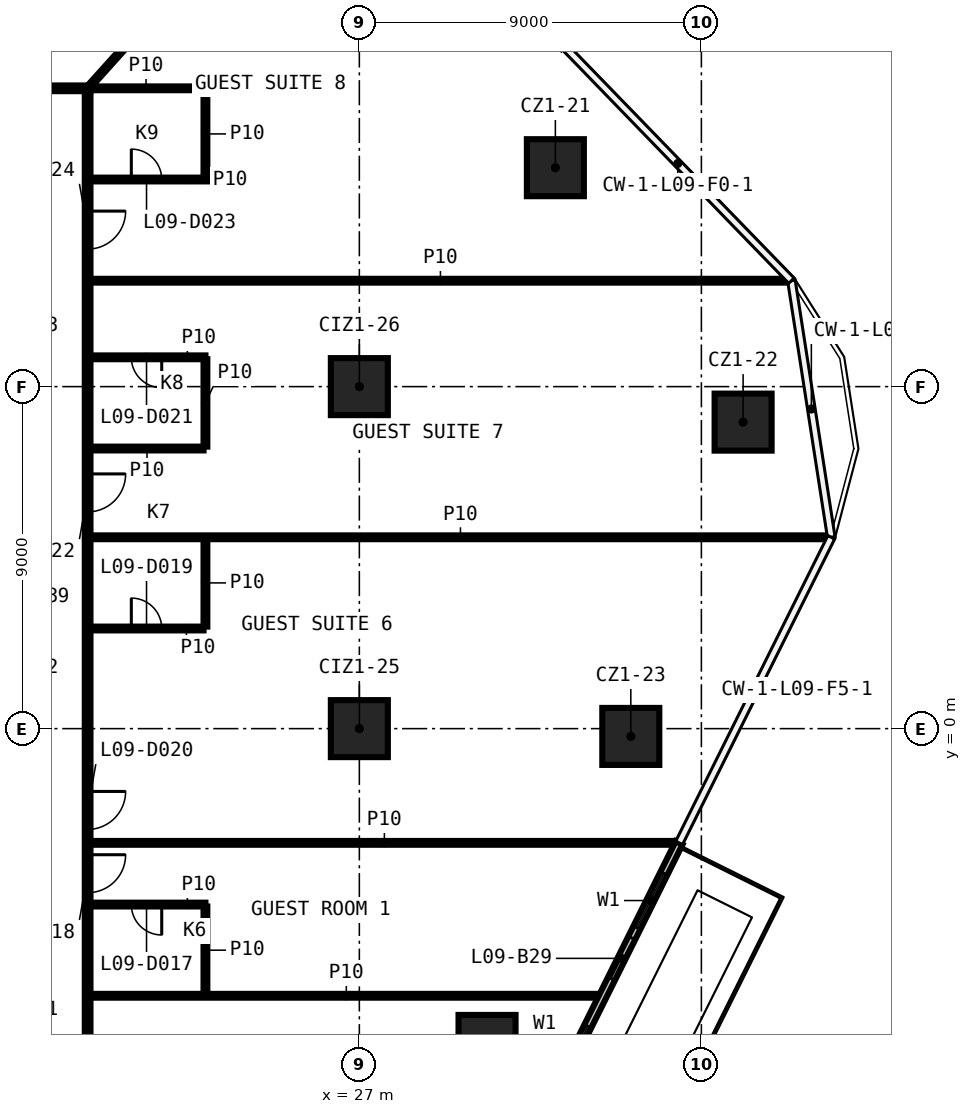
"""IFC4 building model, lengths in metres.
Left out: names, types, materials, properties, quantities, classifications, styles, units other than length and angle.
Written with IfcOpenShell. Run it as: python <this file> out.ifc"""

import sys

from ifc_helpers import new_model, si_unit, direction, frame, frame_2d, origin, origin_2d, place, context, subcontext, project, spatial, rectangle, extrude, element, fill, save


model = new_model("IFC4")
c1 = context("Model", 3, precision=1e-05, world=origin(), true_north=direction((0.0, 1.0)))
c2 = subcontext(c1, "Body", "Model", "MODEL_VIEW")
j1 = project(units=[si_unit("LENGTHUNIT", "METRE"), si_unit("PLANEANGLEUNIT", "RADIAN")], contexts=[c1])
p1 = place(None, origin())
s1 = spatial("IfcSite", under=j1, at=p1, CompositionType="ELEMENT")
p2 = place(p1, origin())
s2 = spatial("IfcBuilding", under=s1, at=p2, CompositionType="ELEMENT")
p3 = place(p2, frame((0.0, 0.0, 55.1)))
s3 = spatial("IfcBuildingStorey", under=s2, at=p3, CompositionType="ELEMENT", Elevation=55.1)
for number, where, z_axis, x_axis in (
    (1, (32.158, 14.761, 0.0), (0.0, 0.0, 1.0), (1.0, 0.0, 0.0)),
    (2, (37.098, 8.066, 0.0), (0.0, 0.0, 1.0), (1.0, 0.0, 0.0)),
    (3, (34.143, -0.205, 0.0), (0.0, 0.0, 1.0), (1.0, 0.0, 0.0)),
    (4, (30.36, -8.284, 0.0), (0.0, 0.0, 1.0), (1.0, 0.0, 0.0)),
    (5, (27.0, 0.0, 0.0), (0.0, 0.0, 1.0), (1.0, 0.0, 0.0)),
    (6, (27.0, 9.0, 0.0), (0.0, 0.0, 1.0), (1.0, 0.0, 0.0)),
):
    element("IfcColumn", number, at=place(p3, frame(where, z_axis=z_axis, x_axis=x_axis)), inside=s3, PredefinedType="COLUMN", context=c2, shape_type="SweptSolid", body=[
        extrude(rectangle(XDim=1.5, YDim=1.5, at=origin_2d()), origin(), (0.0, 0.0, 1.0), 3.3),
    ])
p4 = place(p3, frame((19.925, -7.03, 0.0), z_axis=(0.0, 0.0, 1.0), x_axis=(1.0, 0.0, 0.0)))
e7 = element("IfcWall", 7, at=p4, inside=s3, PredefinedType="PARTITIONING", context=c2, shape_type="SweptSolid", body=[
    extrude(rectangle(XDim=13.464, YDim=0.1, at=frame_2d((6.732, 0.0))), origin(), (0.0, 0.0, 1.0), 3.3),
])
p5 = place(p3, frame((22.95, -4.63, 0.0), z_axis=(0.0, 0.0, 1.0), x_axis=(-1.0, 0.0, 0.0)))
e8 = element("IfcWall", 8, at=p5, inside=s3, PredefinedType="PARTITIONING", context=c2, shape_type="SweptSolid", body=[
    extrude(rectangle(XDim=3.025, YDim=0.1, at=frame_2d((1.512, 0.0))), origin(), (0.0, 0.0, 1.0), 3.3),
])
p6 = place(p5, frame((1.15, 0.0, 0.0)))
e9 = element("IfcOpeningElement", 9, at=p6, cuts=e8, PredefinedType="OPENING", context=c2, shape_type="SweptSolid", body=[
    extrude(rectangle(XDim=0.8, YDim=2.1, at=frame_2d((0.4, 1.05))), frame((0.0, 0.06, 0.0), z_axis=(0.0, -1.0, 0.0), x_axis=(1.0, 0.0, 0.0)), (0.0, 0.0, 1.0), 0.12),
])
p7 = place(p3, frame((19.925, -3.006, 0.0), z_axis=(0.0, 0.0, 1.0), x_axis=(1.0, 0.0, 0.0)))
e10 = element("IfcWall", 10, at=p7, inside=s3, PredefinedType="PARTITIONING", context=c2, shape_type="SweptSolid", body=[
    extrude(rectangle(XDim=15.467, YDim=0.1, at=frame_2d((7.733, 0.0))), origin(), (0.0, 0.0, 1.0), 3.3),
])
p8 = place(p3, frame((19.925, 2.635, 0.0), z_axis=(0.0, 0.0, 1.0), x_axis=(1.0, 0.0, 0.0)))
e11 = element("IfcWall", 11, at=p8, inside=s3, PredefinedType="PARTITIONING", context=c2, shape_type="SweptSolid", body=[
    extrude(rectangle(XDim=2.975, YDim=0.1, at=frame_2d((1.487, 0.0))), origin(), (0.0, 0.0, 1.0), 3.3),
])
p9 = place(p8, frame((1.075, 0.0, 0.0)))
e12 = element("IfcOpeningElement", 12, at=p9, cuts=e11, PredefinedType="OPENING", context=c2, shape_type="SweptSolid", body=[
    extrude(rectangle(XDim=0.8, YDim=2.1, at=frame_2d((0.4, 1.05))), frame((0.0, 0.06, 0.0), z_axis=(0.0, -1.0, 0.0), x_axis=(1.0, 0.0, 0.0)), (0.0, 0.0, 1.0), 0.12),
])
p10 = place(p3, frame((19.925, 5.035, 0.0), z_axis=(0.0, 0.0, 1.0), x_axis=(1.0, 0.0, 0.0)))
e13 = element("IfcWall", 13, at=p10, inside=s3, PredefinedType="PARTITIONING", context=c2, shape_type="SweptSolid", body=[
    extrude(rectangle(XDim=19.47, YDim=0.1, at=frame_2d((9.735, 0.0))), origin(), (0.0, 0.0, 1.0), 3.3),
])
p11 = place(p3, frame((19.925, 7.371, 0.0), z_axis=(0.0, 0.0, 1.0), x_axis=(1.0, 0.0, 0.0)))
e14 = element("IfcWall", 14, at=p11, inside=s3, PredefinedType="PARTITIONING", context=c2, shape_type="SweptSolid", body=[
    extrude(rectangle(XDim=2.975, YDim=0.1, at=frame_2d((1.487, 0.0))), origin(), (0.0, 0.0, 1.0), 3.3),
])
p12 = place(p3, frame((22.95, 9.771, 0.0), z_axis=(0.0, 0.0, 1.0), x_axis=(-1.0, 0.0, 0.0)))
e15 = element("IfcWall", 15, at=p12, inside=s3, PredefinedType="PARTITIONING", context=c2, shape_type="SweptSolid", body=[
    extrude(rectangle(XDim=3.025, YDim=0.1, at=frame_2d((1.512, 0.0))), origin(), (0.0, 0.0, 1.0), 3.3),
])
p13 = place(p12, frame((1.15, 0.0, 0.0)))
e16 = element("IfcOpeningElement", 16, at=p13, cuts=e15, PredefinedType="OPENING", context=c2, shape_type="SweptSolid", body=[
    extrude(rectangle(XDim=0.8, YDim=2.1, at=frame_2d((0.4, 1.05))), frame((0.0, 0.06, 0.0), z_axis=(0.0, -1.0, 0.0), x_axis=(1.0, 0.0, 0.0)), (0.0, 0.0, 1.0), 0.12),
])
p14 = place(p3, frame((19.925, 11.787, 0.0), z_axis=(0.0, 0.0, 1.0), x_axis=(1.0, 0.0, 0.0)))
e17 = element("IfcWall", 17, at=p14, inside=s3, PredefinedType="PARTITIONING", context=c2, shape_type="SweptSolid", body=[
    extrude(rectangle(XDim=18.417, YDim=0.1, at=frame_2d((9.208, 0.0))), origin(), (0.0, 0.0, 1.0), 3.3),
])
p15 = place(p3, frame((19.925, 14.45, 0.0), z_axis=(0.0, 0.0, 1.0), x_axis=(1.0, 0.0, 0.0)))
e18 = element("IfcWall", 18, at=p15, inside=s3, PredefinedType="PARTITIONING", context=c2, shape_type="SweptSolid", body=[
    extrude(rectangle(XDim=3.075, YDim=0.1, at=frame_2d((1.538, 0.0))), origin(), (0.0, 0.0, 1.0), 3.3),
])
p16 = place(p15, frame((1.075, 0.0, 0.0)))
e19 = element("IfcOpeningElement", 19, at=p16, cuts=e18, PredefinedType="OPENING", context=c2, shape_type="SweptSolid", body=[
    extrude(rectangle(XDim=0.8, YDim=2.1, at=frame_2d((0.4, 1.05))), frame((0.0, 0.06, 0.0), z_axis=(0.0, -1.0, 0.0), x_axis=(1.0, 0.0, 0.0)), (0.0, 0.0, 1.0), 0.12),
])
p17 = place(p3, frame((-19.925, 16.85, 0.0), z_axis=(0.0, 0.0, 1.0), x_axis=(1.0, 0.0, 0.0)))
e20 = element("IfcWall", 20, at=p17, inside=s3, PredefinedType="PARTITIONING", context=c2, shape_type="SweptSolid", body=[
    extrude(rectangle(XDim=39.85, YDim=0.15, at=frame_2d((19.925, 0.0))), origin(), (0.0, 0.0, 1.0), 3.3),
])
p18 = place(p17, frame((31.433, 0.0, 0.0)))
e21 = element("IfcOpeningElement", 21, at=p18, cuts=e20, PredefinedType="OPENING", context=c2, shape_type="SweptSolid", body=[
    extrude(rectangle(XDim=0.9, YDim=2.1, at=frame_2d((0.45, 1.05))), frame((0.0, 0.085, 0.0), z_axis=(0.0, -1.0, 0.0), x_axis=(1.0, 0.0, 0.0)), (0.0, 0.0, 1.0), 0.17),
])
p19 = place(p17, frame((22.043, 0.0, 0.0)))
e22 = element("IfcOpeningElement", 22, at=p19, cuts=e20, PredefinedType="OPENING", context=c2, shape_type="SweptSolid", body=[
    extrude(rectangle(XDim=0.9, YDim=2.1, at=frame_2d((0.45, 1.05))), frame((0.0, 0.085, 0.0), z_axis=(0.0, -1.0, 0.0), x_axis=(1.0, 0.0, 0.0)), (0.0, 0.0, 1.0), 0.17),
])
p20 = place(p17, frame((16.957, 0.0, 0.0)))
e23 = element("IfcOpeningElement", 23, at=p20, cuts=e20, PredefinedType="OPENING", context=c2, shape_type="SweptSolid", body=[
    extrude(rectangle(XDim=0.9, YDim=2.1, at=frame_2d((0.45, 1.05))), frame((0.0, 0.085, 0.0), z_axis=(0.0, -1.0, 0.0), x_axis=(1.0, 0.0, 0.0)), (0.0, 0.0, 1.0), 0.17),
])
p21 = place(p17, frame((13.572, 0.0, 0.0)))
e24 = element("IfcOpeningElement", 24, at=p21, cuts=e20, PredefinedType="OPENING", context=c2, shape_type="SweptSolid", body=[
    extrude(rectangle(XDim=0.9, YDim=2.1, at=frame_2d((0.45, 1.05))), frame((0.0, 0.085, 0.0), z_axis=(0.0, -1.0, 0.0), x_axis=(1.0, 0.0, 0.0)), (0.0, 0.0, 1.0), 0.17),
])
p22 = place(p17, frame((7.458, 0.0, 0.0)))
e25 = element("IfcOpeningElement", 25, at=p22, cuts=e20, PredefinedType="OPENING", context=c2, shape_type="SweptSolid", body=[
    extrude(rectangle(XDim=1.0, YDim=2.1, at=frame_2d((0.5, 1.05))), frame((0.0, 0.085, 0.0), z_axis=(0.0, -1.0, 0.0), x_axis=(1.0, 0.0, 0.0)), (0.0, 0.0, 1.0), 0.17),
])
p23 = place(p3, frame((19.775, 16.85, 0.0), z_axis=(0.0, 0.0, 1.0), x_axis=(1.0, 0.0, 0.0)))
e26 = element("IfcWall", 26, at=p23, inside=s3, PredefinedType="PARTITIONING", context=c2, shape_type="SweptSolid", body=[
    extrude(rectangle(XDim=3.225, YDim=0.1, at=frame_2d((1.613, 0.0))), origin(), (0.0, 0.0, 1.0), 3.3),
])
p24 = place(p3, frame((19.85, 16.85, 0.0), z_axis=(0.0, 0.0, 1.0), x_axis=(0.668734291705, 0.743501477536, 0.0)))
e27 = element("IfcWall", 27, at=p24, inside=s3, PredefinedType="PARTITIONING", context=c2, shape_type="SweptSolid", body=[
    extrude(rectangle(XDim=9.776, YDim=0.1, at=frame_2d((4.888, 0.0))), origin(), (0.0, 0.0, 1.0), 3.3),
])
p25 = place(p3, frame((22.95, -6.98, 0.0), z_axis=(0.0, 0.0, 1.0), x_axis=(0.0, 1.0, 0.0)))
e28 = element("IfcWall", 28, at=p25, inside=s3, PredefinedType="PARTITIONING", context=c2, shape_type="SweptSolid", body=[
    extrude(rectangle(XDim=2.3, YDim=0.1, at=frame_2d((1.15, 0.0))), origin(), (0.0, 0.0, 1.0), 3.3),
])
for number, where, z_axis, x_axis in (
    (29, (22.95, 2.685, 0.0), (0.0, 0.0, 1.0), (0.0, 1.0, 0.0)),
    (30, (22.95, 7.421, 0.0), (0.0, 0.0, 1.0), (0.0, 1.0, 0.0)),
):
    element("IfcWall", number, at=place(p3, frame(where, z_axis=z_axis, x_axis=x_axis)), inside=s3, PredefinedType="PARTITIONING", context=c2, shape_type="SweptSolid", body=[
        extrude(rectangle(XDim=2.3, YDim=0.1, at=frame_2d((1.15, 0.0))), origin(), (0.0, 0.0, 1.0), 3.3),
    ])
p26 = place(p3, frame((22.95, 14.5, 0.0), z_axis=(0.0, 0.0, 1.0), x_axis=(0.0, 1.0, 0.0)))
e31 = element("IfcWall", 31, at=p26, inside=s3, PredefinedType="PARTITIONING", context=c2, shape_type="SweptSolid", body=[
    extrude(rectangle(XDim=2.3, YDim=0.1, at=frame_2d((1.15, 0.0))), origin(), (0.0, 0.0, 1.0), 3.3),
])
p27 = place(p3, frame((19.85, 16.775, 0.0), z_axis=(0.0, 0.0, 1.0), x_axis=(0.0, -1.0, 0.0)))
e32 = element("IfcWall", 32, at=p27, inside=s3, PredefinedType="PARTITIONING", context=c2, shape_type="SweptSolid", body=[
    extrude(rectangle(XDim=33.55, YDim=0.15, at=frame_2d((16.775, 0.0))), origin(), (0.0, 0.0, 1.0), 3.3),
])
p28 = place(p27, frame((32.158, 0.0, 0.0)))
e33 = element("IfcOpeningElement", 33, at=p28, cuts=e32, PredefinedType="OPENING", context=c2, shape_type="SweptSolid", body=[
    extrude(rectangle(XDim=1.0, YDim=2.1, at=frame_2d((0.5, 1.05))), frame((0.0, 0.085, 0.0), z_axis=(0.0, -1.0, 0.0), x_axis=(1.0, 0.0, 0.0)), (0.0, 0.0, 1.0), 0.17),
])
p29 = place(p27, frame((20.094, 0.0, 0.0)))
e34 = element("IfcOpeningElement", 34, at=p29, cuts=e32, PredefinedType="OPENING", context=c2, shape_type="SweptSolid", body=[
    extrude(rectangle(XDim=1.0, YDim=2.1, at=frame_2d((0.5, 1.05))), frame((0.0, 0.085, 0.0), z_axis=(0.0, -1.0, 0.0), x_axis=(1.0, 0.0, 0.0)), (0.0, 0.0, 1.0), 0.17),
])
p30 = place(p27, frame((18.428, 0.0, 0.0)))
e35 = element("IfcOpeningElement", 35, at=p30, cuts=e32, PredefinedType="OPENING", context=c2, shape_type="SweptSolid", body=[
    extrude(rectangle(XDim=1.0, YDim=2.1, at=frame_2d((0.5, 1.05))), frame((0.0, 0.085, 0.0), z_axis=(0.0, -1.0, 0.0), x_axis=(1.0, 0.0, 0.0)), (0.0, 0.0, 1.0), 0.17),
])
p31 = place(p27, frame((10.072, 0.0, 0.0)))
e36 = element("IfcOpeningElement", 36, at=p31, cuts=e32, PredefinedType="OPENING", context=c2, shape_type="SweptSolid", body=[
    extrude(rectangle(XDim=1.0, YDim=2.1, at=frame_2d((0.5, 1.05))), frame((0.0, 0.085, 0.0), z_axis=(0.0, -1.0, 0.0), x_axis=(1.0, 0.0, 0.0)), (0.0, 0.0, 1.0), 0.17),
])
p32 = place(p27, frame((3.156, 0.0, 0.0)))
e37 = element("IfcOpeningElement", 37, at=p32, cuts=e32, PredefinedType="OPENING", context=c2, shape_type="SweptSolid", body=[
    extrude(rectangle(XDim=1.0, YDim=2.1, at=frame_2d((0.5, 1.05))), frame((0.0, 0.085, 0.0), z_axis=(0.0, -1.0, 0.0), x_axis=(1.0, 0.0, 0.0)), (0.0, 0.0, 1.0), 0.17),
])
p33 = place(p3, frame((21.391, -31.175, 0.0), z_axis=(0.0, 0.0, 1.0), x_axis=(0.445673586032, 0.895195539932, 0.0)))
e38 = element("IfcWall", 38, at=p33, inside=s3, PredefinedType="SOLIDWALL", context=c2, shape_type="SweptSolid", body=[
    extrude(rectangle(XDim=31.466, YDim=0.2, at=frame_2d((15.733, 0.0))), origin(), (0.0, 0.0, 1.0), 3.3),
])
p34 = place(p33, frame((2.0, 0.0, 0.6)))
e39 = element("IfcOpeningElement", 39, at=p34, cuts=e38, PredefinedType="OPENING", context=c2, shape_type="SweptSolid", body=[
    extrude(rectangle(XDim=1.6, YDim=2.4, at=frame_2d((0.8, 1.2))), frame((0.0, 0.11, 0.0), z_axis=(0.0, -1.0, 0.0), x_axis=(1.0, 0.0, 0.0)), (0.0, 0.0, 1.0), 0.22),
])
p35 = place(p33, frame((0.5, 0.0, 0.0)))
e40 = element("IfcOpeningElement", 40, at=p35, cuts=e38, PredefinedType="OPENING", context=c2, shape_type="SweptSolid", body=[
    extrude(rectangle(XDim=1.2, YDim=2.4, at=frame_2d((0.6, 1.2))), frame((0.0, 0.11, 0.0), z_axis=(0.0, -1.0, 0.0), x_axis=(1.0, 0.0, 0.0)), (0.0, 0.0, 1.0), 0.22),
])
p36 = place(p33, frame((4.995, 0.0, 0.6)))
e41 = element("IfcOpeningElement", 41, at=p36, cuts=e38, PredefinedType="OPENING", context=c2, shape_type="SweptSolid", body=[
    extrude(rectangle(XDim=1.6, YDim=2.4, at=frame_2d((0.8, 1.2))), frame((0.0, 0.11, 0.0), z_axis=(0.0, -1.0, 0.0), x_axis=(1.0, 0.0, 0.0)), (0.0, 0.0, 1.0), 0.22),
])
p37 = place(p33, frame((7.495, 0.0, 0.0)))
e42 = element("IfcOpeningElement", 42, at=p37, cuts=e38, PredefinedType="OPENING", context=c2, shape_type="SweptSolid", body=[
    extrude(rectangle(XDim=1.2, YDim=2.4, at=frame_2d((0.6, 1.2))), frame((0.0, 0.11, 0.0), z_axis=(0.0, -1.0, 0.0), x_axis=(1.0, 0.0, 0.0)), (0.0, 0.0, 1.0), 0.22),
])
p38 = place(p33, frame((10.99, 0.0, 0.6)))
e43 = element("IfcOpeningElement", 43, at=p38, cuts=e38, PredefinedType="OPENING", context=c2, shape_type="SweptSolid", body=[
    extrude(rectangle(XDim=1.6, YDim=2.4, at=frame_2d((0.8, 1.2))), frame((0.0, 0.11, 0.0), z_axis=(0.0, -1.0, 0.0), x_axis=(1.0, 0.0, 0.0)), (0.0, 0.0, 1.0), 0.22),
])
p39 = place(p33, frame((9.49, 0.0, 0.0)))
e44 = element("IfcOpeningElement", 44, at=p39, cuts=e38, PredefinedType="OPENING", context=c2, shape_type="SweptSolid", body=[
    extrude(rectangle(XDim=1.2, YDim=2.4, at=frame_2d((0.6, 1.2))), frame((0.0, 0.11, 0.0), z_axis=(0.0, -1.0, 0.0), x_axis=(1.0, 0.0, 0.0)), (0.0, 0.0, 1.0), 0.22),
])
p40 = place(p33, frame((13.986, 0.0, 0.6)))
e45 = element("IfcOpeningElement", 45, at=p40, cuts=e38, PredefinedType="OPENING", context=c2, shape_type="SweptSolid", body=[
    extrude(rectangle(XDim=1.6, YDim=2.4, at=frame_2d((0.8, 1.2))), frame((0.0, 0.11, 0.0), z_axis=(0.0, -1.0, 0.0), x_axis=(1.0, 0.0, 0.0)), (0.0, 0.0, 1.0), 0.22),
])
p41 = place(p33, frame((16.085, 0.0, 0.0)))
e46 = element("IfcOpeningElement", 46, at=p41, cuts=e38, PredefinedType="OPENING", context=c2, shape_type="SweptSolid", body=[
    extrude(rectangle(XDim=1.2, YDim=2.4, at=frame_2d((0.6, 1.2))), frame((0.0, 0.11, 0.0), z_axis=(0.0, -1.0, 0.0), x_axis=(1.0, 0.0, 0.0)), (0.0, 0.0, 1.0), 0.22),
])
p42 = place(p33, frame((19.981, 0.0, 0.6)))
e47 = element("IfcOpeningElement", 47, at=p42, cuts=e38, PredefinedType="OPENING", context=c2, shape_type="SweptSolid", body=[
    extrude(rectangle(XDim=1.6, YDim=2.4, at=frame_2d((0.8, 1.2))), frame((0.0, 0.11, 0.0), z_axis=(0.0, -1.0, 0.0), x_axis=(1.0, 0.0, 0.0)), (0.0, 0.0, 1.0), 0.22),
])
p43 = place(p33, frame((18.481, 0.0, 0.0)))
e48 = element("IfcOpeningElement", 48, at=p43, cuts=e38, PredefinedType="OPENING", context=c2, shape_type="SweptSolid", body=[
    extrude(rectangle(XDim=1.2, YDim=2.4, at=frame_2d((0.6, 1.2))), frame((0.0, 0.11, 0.0), z_axis=(0.0, -1.0, 0.0), x_axis=(1.0, 0.0, 0.0)), (0.0, 0.0, 1.0), 0.22),
])
p44 = place(p33, frame((24.476, 0.0, 0.6)))
e49 = element("IfcOpeningElement", 49, at=p44, cuts=e38, PredefinedType="OPENING", context=c2, shape_type="SweptSolid", body=[
    extrude(rectangle(XDim=1.6, YDim=2.4, at=frame_2d((0.8, 1.2))), frame((0.0, 0.11, 0.0), z_axis=(0.0, -1.0, 0.0), x_axis=(1.0, 0.0, 0.0)), (0.0, 0.0, 1.0), 0.22),
])
p45 = place(p33, frame((22.776, 0.0, 0.0)))
e50 = element("IfcOpeningElement", 50, at=p45, cuts=e38, PredefinedType="OPENING", context=c2, shape_type="SweptSolid", body=[
    extrude(rectangle(XDim=1.2, YDim=2.4, at=frame_2d((0.6, 1.2))), frame((0.0, 0.11, 0.0), z_axis=(0.0, -1.0, 0.0), x_axis=(1.0, 0.0, 0.0)), (0.0, 0.0, 1.0), 0.22),
])
p46 = place(p33, frame((28.971, 0.0, 0.6)))
e51 = element("IfcOpeningElement", 51, at=p46, cuts=e38, PredefinedType="OPENING", context=c2, shape_type="SweptSolid", body=[
    extrude(rectangle(XDim=1.6, YDim=2.4, at=frame_2d((0.8, 1.2))), frame((0.0, 0.11, 0.0), z_axis=(0.0, -1.0, 0.0), x_axis=(1.0, 0.0, 0.0)), (0.0, 0.0, 1.0), 0.22),
])
p47 = place(p33, frame((27.471, 0.0, 0.0)))
e52 = element("IfcOpeningElement", 52, at=p47, cuts=e38, PredefinedType="OPENING", context=c2, shape_type="SweptSolid", body=[
    extrude(rectangle(XDim=1.2, YDim=2.4, at=frame_2d((0.6, 1.2))), frame((0.0, 0.11, 0.0), z_axis=(0.0, -1.0, 0.0), x_axis=(1.0, 0.0, 0.0)), (0.0, 0.0, 1.0), 0.22),
])
p48 = place(p6, origin())
e53 = element("IfcDoor", 53, at=p48, inside=s3, OperationType="SINGLE_SWING_LEFT", PredefinedType="DOOR", context=c2, shape_type="SweptSolid", body=[
    extrude(rectangle(XDim=0.8, YDim=2.1, at=frame_2d((0.4, 1.05))), frame((0.0, 0.025, 0.0), z_axis=(0.0, -1.0, 0.0), x_axis=(1.0, 0.0, 0.0)), (0.0, 0.0, 1.0), 0.05),
])
fill(e9, e53)
p49 = place(p29, origin())
e54 = element("IfcDoor", 54, at=p49, inside=s3, OperationType="SINGLE_SWING_RIGHT", PredefinedType="DOOR", context=c2, shape_type="SweptSolid", body=[
    extrude(rectangle(XDim=1.0, YDim=2.1, at=frame_2d((0.5, 1.05))), frame((0.0, 0.025, 0.0), z_axis=(0.0, -1.0, 0.0), x_axis=(1.0, 0.0, 0.0)), (0.0, 0.0, 1.0), 0.05),
])
fill(e34, e54)
p50 = place(p9, origin())
e55 = element("IfcDoor", 55, at=p50, inside=s3, OperationType="SINGLE_SWING_RIGHT", PredefinedType="DOOR", context=c2, shape_type="SweptSolid", body=[
    extrude(rectangle(XDim=0.8, YDim=2.1, at=frame_2d((0.4, 1.05))), frame((0.0, 0.025, 0.0), z_axis=(0.0, -1.0, 0.0), x_axis=(1.0, 0.0, 0.0)), (0.0, 0.0, 1.0), 0.05),
])
fill(e12, e55)
p51 = place(p30, origin())
e56 = element("IfcDoor", 56, at=p51, inside=s3, OperationType="SINGLE_SWING_LEFT", PredefinedType="DOOR", context=c2, shape_type="SweptSolid", body=[
    extrude(rectangle(XDim=1.0, YDim=2.1, at=frame_2d((0.5, 1.05))), frame((0.0, 0.025, 0.0), z_axis=(0.0, -1.0, 0.0), x_axis=(1.0, 0.0, 0.0)), (0.0, 0.0, 1.0), 0.05),
])
fill(e35, e56)
p52 = place(p13, origin())
e57 = element("IfcDoor", 57, at=p52, inside=s3, OperationType="SINGLE_SWING_LEFT", PredefinedType="DOOR", context=c2, shape_type="SweptSolid", body=[
    extrude(rectangle(XDim=0.8, YDim=2.1, at=frame_2d((0.4, 1.05))), frame((0.0, 0.025, 0.0), z_axis=(0.0, -1.0, 0.0), x_axis=(1.0, 0.0, 0.0)), (0.0, 0.0, 1.0), 0.05),
])
fill(e16, e57)
p53 = place(p31, origin())
e58 = element("IfcDoor", 58, at=p53, inside=s3, OperationType="SINGLE_SWING_RIGHT", PredefinedType="DOOR", context=c2, shape_type="SweptSolid", body=[
    extrude(rectangle(XDim=1.0, YDim=2.1, at=frame_2d((0.5, 1.05))), frame((0.0, 0.025, 0.0), z_axis=(0.0, -1.0, 0.0), x_axis=(1.0, 0.0, 0.0)), (0.0, 0.0, 1.0), 0.05),
])
fill(e36, e58)
p54 = place(p16, origin())
e59 = element("IfcDoor", 59, at=p54, inside=s3, OperationType="SINGLE_SWING_RIGHT", PredefinedType="DOOR", context=c2, shape_type="SweptSolid", body=[
    extrude(rectangle(XDim=0.8, YDim=2.1, at=frame_2d((0.4, 1.05))), frame((0.0, 0.025, 0.0), z_axis=(0.0, -1.0, 0.0), x_axis=(1.0, 0.0, 0.0)), (0.0, 0.0, 1.0), 0.05),
])
fill(e19, e59)
p55 = place(p32, origin())
e60 = element("IfcDoor", 60, at=p55, inside=s3, OperationType="SINGLE_SWING_LEFT", PredefinedType="DOOR", context=c2, shape_type="SweptSolid", body=[
    extrude(rectangle(XDim=1.0, YDim=2.1, at=frame_2d((0.5, 1.05))), frame((0.0, 0.025, 0.0), z_axis=(0.0, -1.0, 0.0), x_axis=(1.0, 0.0, 0.0)), (0.0, 0.0, 1.0), 0.05),
])
fill(e37, e60)
p56 = place(p44, origin())
e61 = element("IfcWindow", 61, at=p56, inside=s3, PartitioningType="SINGLE_PANEL", PredefinedType="WINDOW", context=c2, shape_type="SweptSolid", body=[
    extrude(rectangle(XDim=1.6, YDim=2.4, at=frame_2d((0.8, 1.2))), frame((0.0, 0.03, 0.0), z_axis=(0.0, -1.0, 0.0), x_axis=(1.0, 0.0, 0.0)), (0.0, 0.0, 1.0), 0.06),
])
fill(e49, e61)
p57 = place(p46, origin())
e62 = element("IfcWindow", 62, at=p57, inside=s3, PartitioningType="SINGLE_PANEL", PredefinedType="WINDOW", context=c2, shape_type="SweptSolid", body=[
    extrude(rectangle(XDim=1.6, YDim=2.4, at=frame_2d((0.8, 1.2))), frame((0.0, 0.03, 0.0), z_axis=(0.0, -1.0, 0.0), x_axis=(1.0, 0.0, 0.0)), (0.0, 0.0, 1.0), 0.06),
])
fill(e51, e62)
p58 = place(p47, origin())
e63 = element("IfcDoor", 63, at=p58, inside=s3, OperationType="SLIDING_TO_LEFT", PredefinedType="DOOR", context=c2, shape_type="SweptSolid", body=[
    extrude(rectangle(XDim=1.2, YDim=2.4, at=frame_2d((0.6, 1.2))), frame((0.0, 0.025, 0.0), z_axis=(0.0, -1.0, 0.0), x_axis=(1.0, 0.0, 0.0)), (0.0, 0.0, 1.0), 0.05),
])
fill(e52, e63)
save(model, sys.argv[1])
